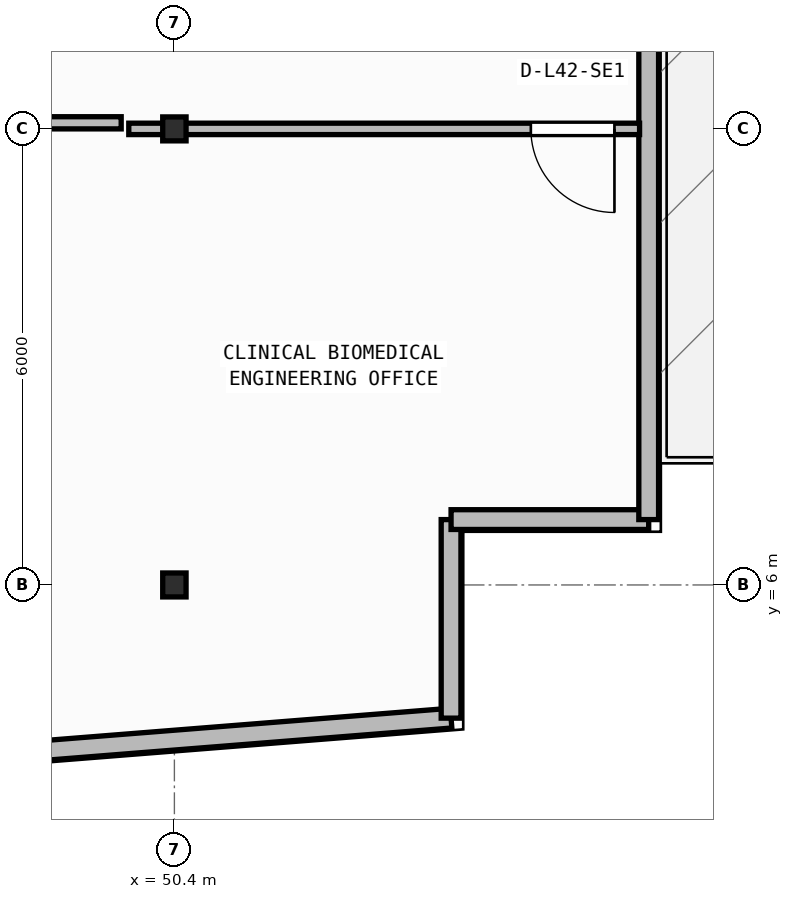
"""IFC4 building model, lengths in metres.
Left out: names, types, materials, properties, quantities, classifications, styles, units other than length and angle.
Written with IfcOpenShell. Run it as: python <this file> out.ifc"""

import sys

from ifc_helpers import new_model, si_unit, direction, frame, frame_2d, origin, origin_2d, place, context, subcontext, project, spatial, rectangle, i_section, extrude, element, fill, save


model = new_model("IFC4")
c1 = context("Model", 3, precision=1e-05, world=origin(), true_north=direction((0.0, 1.0)))
c2 = subcontext(c1, "Body", "Model", "MODEL_VIEW")
j1 = project(units=[si_unit("LENGTHUNIT", "METRE"), si_unit("PLANEANGLEUNIT", "RADIAN")], contexts=[c1])
p1 = place(None, origin())
s1 = spatial("IfcSite", under=j1, at=p1, CompositionType="ELEMENT")
p2 = place(p1, origin())
s2 = spatial("IfcBuilding", under=s1, at=p2, CompositionType="ELEMENT")
p3 = place(p2, frame((0.0, 0.0, 170.5)))
s3 = spatial("IfcBuildingStorey", under=s2, at=p3, CompositionType="ELEMENT", Elevation=170.5)
for number, where, z_axis, x_axis in (
    (1, (50.4, 6.0, 0.0), (0.0, 0.0, 1.0), (1.0, 0.0, 0.0)),
    (2, (50.4, 12.0, 0.0), (0.0, 0.0, 1.0), (1.0, 0.0, 0.0)),
):
    element("IfcColumn", number, at=place(p3, frame(where, z_axis=z_axis, x_axis=x_axis)), inside=s3, PredefinedType="COLUMN", context=c2, shape_type="SweptSolid", body=[
        extrude(i_section(OverallWidth=0.307, OverallDepth=0.315, WebThickness=0.012, FlangeThickness=0.019, FilletRadius=0.017, at=origin_2d()), origin(), (0.0, 0.0, 1.0), 3.95),
    ])
p4 = place(p3, frame((2.76, 0.173, 0.0), z_axis=(0.0, 0.0, 1.0), x_axis=(0.996857931723, 0.079210251617, 0.0)))
e3 = element("IfcWall", 3, at=p4, inside=s3, PredefinedType="STANDARD", context=c2, shape_type="SweptSolid", body=[
    extrude(rectangle(XDim=51.442, YDim=0.26, at=frame_2d((25.721, 0.0))), origin(), (0.0, 0.0, 1.0), 3.67),
])
p5 = place(p4, frame((24.521, 0.0, 0.9)))
e4 = element("IfcOpeningElement", 4, at=p5, cuts=e3, PredefinedType="OPENING", context=c2, shape_type="SweptSolid", body=[
    extrude(rectangle(XDim=2.4, YDim=1.65, at=frame_2d((1.2, 0.825))), frame((0.0, 0.14, 0.0), z_axis=(0.0, -1.0, 0.0), x_axis=(1.0, 0.0, 0.0)), (0.0, 0.0, 1.0), 0.28),
])
p6 = place(p3, frame((54.04, 4.248, 0.0), z_axis=(0.0, 0.0, 1.0), x_axis=(0.0, 1.0, 0.0)))
e5 = element("IfcWall", 5, at=p6, inside=s3, PredefinedType="STANDARD", context=c2, shape_type="SweptSolid", body=[
    extrude(rectangle(XDim=2.612, YDim=0.26, at=frame_2d((1.306, 0.0))), origin(), (0.0, 0.0, 1.0), 3.67),
])
p7 = place(p3, frame((54.04, 6.86, 0.0), z_axis=(0.0, 0.0, 1.0), x_axis=(1.0, 0.0, 0.0)))
e6 = element("IfcWall", 6, at=p7, inside=s3, PredefinedType="STANDARD", context=c2, shape_type="SweptSolid", body=[
    extrude(rectangle(XDim=2.6, YDim=0.26, at=frame_2d((1.3, 0.0))), origin(), (0.0, 0.0, 1.0), 3.67),
])
p8 = place(p3, frame((56.64, 6.86, 0.0), z_axis=(0.0, 0.0, 1.0), x_axis=(0.0, 1.0, 0.0)))
e7 = element("IfcWall", 7, at=p8, inside=s3, PredefinedType="STANDARD", context=c2, shape_type="SweptSolid", body=[
    extrude(rectangle(XDim=23.48, YDim=0.26, at=frame_2d((11.74, 0.0))), origin(), (0.0, 0.0, 1.0), 3.67),
])
p9 = place(p8, frame((11.09, 0.0, 0.0)))
e8 = element("IfcOpeningElement", 8, at=p9, cuts=e7, PredefinedType="OPENING", context=c2, shape_type="SweptSolid", body=[
    extrude(rectangle(XDim=1.3, YDim=2.15, at=frame_2d((0.65, 1.075))), frame((0.0, 0.14, 0.0), z_axis=(0.0, -1.0, 0.0), x_axis=(1.0, 0.0, 0.0)), (0.0, 0.0, 1.0), 0.28),
])
p10 = place(p3, frame((56.52, 12.0, 0.0), z_axis=(0.0, 0.0, 1.0), x_axis=(-1.0, 0.0, 0.0)))
e9 = element("IfcWall", 9, at=p10, inside=s3, PredefinedType="PARTITIONING", context=c2, shape_type="SweptSolid", body=[
    extrude(rectangle(XDim=6.72, YDim=0.15, at=frame_2d((3.36, 0.0))), origin(), (0.0, 0.0, 1.0), 3.043),
])
p11 = place(p10, frame((0.331, 0.0, 0.0)))
e10 = element("IfcOpeningElement", 10, at=p11, cuts=e9, PredefinedType="OPENING", context=c2, shape_type="SweptSolid", body=[
    extrude(rectangle(XDim=1.1, YDim=2.1, at=frame_2d((0.55, 1.05))), frame((0.0, 0.085, 0.0), z_axis=(0.0, -1.0, 0.0), x_axis=(1.0, 0.0, 0.0)), (0.0, 0.0, 1.0), 0.17),
])
p12 = place(p3, frame((46.689, 12.08, 0.0), z_axis=(0.0, 0.0, 1.0), x_axis=(1.0, 0.0, 0.0)))
e11 = element("IfcWall", 11, at=p12, inside=s3, PredefinedType="PARTITIONING", context=c2, shape_type="SweptSolid", body=[
    extrude(rectangle(XDim=3.011, YDim=0.16, at=frame_2d((1.505, 0.0))), origin(), (0.0, 0.0, 1.0), 3.043),
])
p13 = place(p11, origin())
e12 = element("IfcDoor", 12, at=p13, inside=s3, OperationType="SINGLE_SWING_LEFT", PredefinedType="DOOR", context=c2, shape_type="SweptSolid", body=[
    extrude(rectangle(XDim=1.1, YDim=2.1, at=frame_2d((0.55, 1.05))), frame((0.0, 0.025, 0.0), z_axis=(0.0, -1.0, 0.0), x_axis=(1.0, 0.0, 0.0)), (0.0, 0.0, 1.0), 0.05),
])
fill(e10, e12)
save(model, sys.argv[1])
